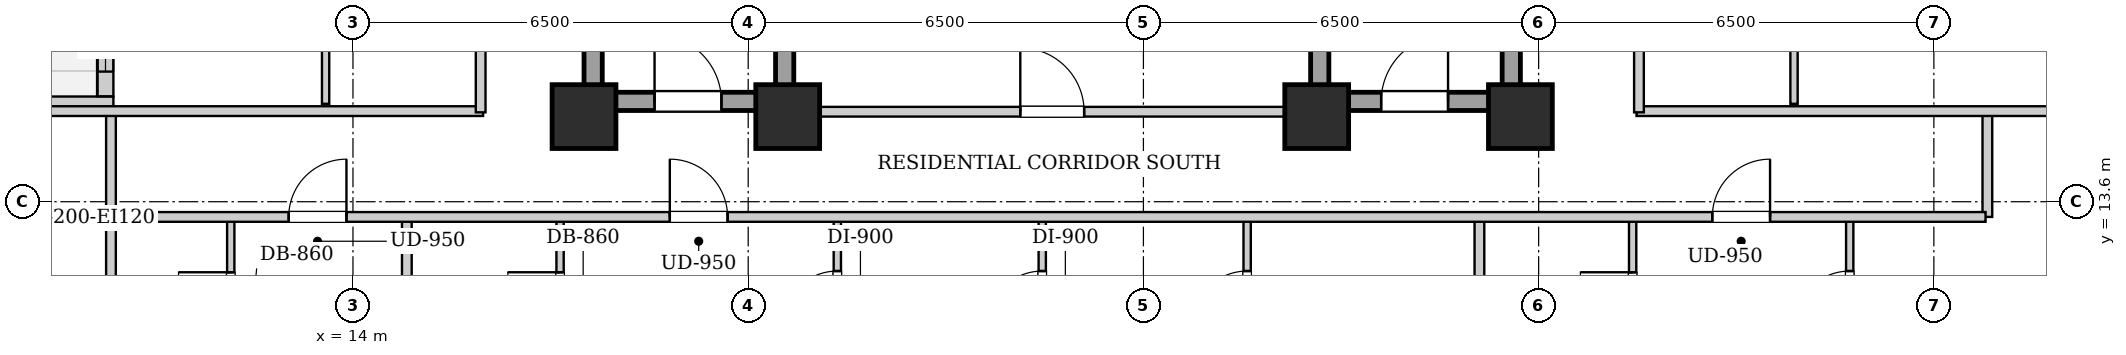
"""IFC4 building model, lengths in metres.
Left out: names, types, materials, properties, quantities, classifications, styles, units other than length and angle.
Written with IfcOpenShell. Run it as: python <this file> out.ifc"""

import sys

from ifc_helpers import new_model, si_unit, direction, frame, frame_2d, origin, origin_2d, place, context, subcontext, project, spatial, rectangle, extrude, element, fill, save


model = new_model("IFC4")
c1 = context("Model", 3, precision=1e-05, world=origin(), true_north=direction((0.0, 1.0)))
c2 = subcontext(c1, "Body", "Model", "MODEL_VIEW")
j1 = project(units=[si_unit("LENGTHUNIT", "METRE"), si_unit("PLANEANGLEUNIT", "RADIAN")], contexts=[c1])
p1 = place(None, origin())
s1 = spatial("IfcSite", under=j1, at=p1, CompositionType="ELEMENT")
p2 = place(p1, origin())
s2 = spatial("IfcBuilding", under=s1, at=p2, CompositionType="ELEMENT")
p3 = place(p2, frame((0.0, 0.0, 75.1)))
s3 = spatial("IfcBuildingStorey", under=s2, at=p3, CompositionType="ELEMENT", Elevation=75.1)
for number, where, z_axis, x_axis in (
    (1, (17.8, 15.0, 0.0), (0.0, 0.0, 1.0), (1.0, 0.0, 0.0)),
    (2, (21.15, 15.0, 0.0), (0.0, 0.0, 1.0), (1.0, 0.0, 0.0)),
    (3, (29.85, 15.0, 0.0), (0.0, 0.0, 1.0), (1.0, 0.0, 0.0)),
    (4, (33.2, 15.0, 0.0), (0.0, 0.0, 1.0), (1.0, 0.0, 0.0)),
):
    element("IfcColumn", number, at=place(p3, frame(where, z_axis=z_axis, x_axis=x_axis)), inside=s3, PredefinedType="COLUMN", context=c2, shape_type="SweptSolid", body=[
        extrude(rectangle(XDim=1.05, YDim=1.05, at=origin_2d()), origin(), (0.0, 0.0, 1.0), 3.2),
    ])
p4 = place(p3, frame((7.66, 15.2, 0.0), z_axis=(0.0, 0.0, 1.0), x_axis=(1.0, 0.0, 0.0)))
e5 = element("IfcWall", 5, at=p4, inside=s3, PredefinedType="SOLIDWALL", context=c2, shape_type="SweptSolid", body=[
    extrude(rectangle(XDim=2.4, YDim=0.26, at=frame_2d((1.2, 0.0))), origin(), (0.0, 0.0, 1.0), 2.94),
])
p5 = place(p3, frame((9.93, 15.334, 0.0), z_axis=(0.0, 0.0, 1.0), x_axis=(0.0, 1.0, 0.0)))
e6 = element("IfcWall", 6, at=p5, inside=s3, PredefinedType="SOLIDWALL", context=c2, shape_type="SweptSolid", body=[
    extrude(rectangle(XDim=3.932, YDim=0.26, at=frame_2d((1.966, 0.0))), origin(), (0.0, 0.0, 1.0), 2.94),
])
p6 = place(p5, frame((1.416, 0.0, 0.0)))
e7 = element("IfcOpeningElement", 7, at=p6, cuts=e6, PredefinedType="OPENING", context=c2, shape_type="SweptSolid", body=[
    extrude(rectangle(XDim=1.1, YDim=2.0, at=frame_2d((0.55, 1.0))), frame((0.0, 0.14, 0.0), z_axis=(0.0, -1.0, 0.0), x_axis=(1.0, 0.0, 0.0)), (0.0, 0.0, 1.0), 0.28),
])
p7 = place(p5, frame((0.406, 0.0, 0.55)))
e8 = element("IfcOpeningElement", 8, at=p7, cuts=e6, PredefinedType="OPENING", context=c2, shape_type="SweptSolid", body=[
    extrude(rectangle(XDim=0.85, YDim=1.2, at=frame_2d((0.425, 0.6))), frame((0.0, 0.14, 0.0), z_axis=(0.0, -1.0, 0.0), x_axis=(1.0, 0.0, 0.0)), (0.0, 0.0, 1.0), 0.28),
])
for number, where, z_axis, x_axis in (
    (9, (17.95, 15.1, 0.0), (0.0, 0.0, 1.0), (0.0, 1.0, 0.0)),
    (10, (21.1, 15.1, 0.0), (0.0, 0.0, 1.0), (0.0, 1.0, 0.0)),
):
    element("IfcWall", number, at=place(p3, frame(where, z_axis=z_axis, x_axis=x_axis)), inside=s3, PredefinedType="SHEAR", context=c2, shape_type="SweptSolid", body=[
        extrude(rectangle(XDim=9.0, YDim=0.3, at=frame_2d((4.5, 0.0))), origin(), (0.0, 0.0, 1.0), 2.94),
    ])
p8 = place(p3, frame((18.1, 15.25, 0.0), z_axis=(0.0, 0.0, 1.0), x_axis=(1.0, 0.0, 0.0)))
e11 = element("IfcWall", 11, at=p8, inside=s3, PredefinedType="SHEAR", context=c2, shape_type="SweptSolid", body=[
    extrude(rectangle(XDim=2.85, YDim=0.3, at=frame_2d((1.425, 0.0))), origin(), (0.0, 0.0, 1.0), 2.94),
])
p9 = place(p8, frame((0.86, 0.0, 0.0)))
e12 = element("IfcOpeningElement", 12, at=p9, cuts=e11, PredefinedType="OPENING", context=c2, shape_type="SweptSolid", body=[
    extrude(rectangle(XDim=1.1, YDim=2.05, at=frame_2d((0.55, 1.025))), frame((0.0, 0.16, 0.0), z_axis=(0.0, -1.0, 0.0), x_axis=(1.0, 0.0, 0.0)), (0.0, 0.0, 1.0), 0.32),
])
for number, where, z_axis, x_axis in (
    (13, (29.9, 15.1, 0.0), (0.0, 0.0, 1.0), (0.0, 1.0, 0.0)),
    (14, (33.05, 15.1, 0.0), (0.0, 0.0, 1.0), (0.0, 1.0, 0.0)),
):
    element("IfcWall", number, at=place(p3, frame(where, z_axis=z_axis, x_axis=x_axis)), inside=s3, PredefinedType="SHEAR", context=c2, shape_type="SweptSolid", body=[
        extrude(rectangle(XDim=9.0, YDim=0.3, at=frame_2d((4.5, 0.0))), origin(), (0.0, 0.0, 1.0), 2.94),
    ])
p10 = place(p3, frame((30.05, 15.25, 0.0), z_axis=(0.0, 0.0, 1.0), x_axis=(1.0, 0.0, 0.0)))
e15 = element("IfcWall", 15, at=p10, inside=s3, PredefinedType="SHEAR", context=c2, shape_type="SweptSolid", body=[
    extrude(rectangle(XDim=2.85, YDim=0.3, at=frame_2d((1.425, 0.0))), origin(), (0.0, 0.0, 1.0), 2.94),
])
p11 = place(p10, frame((0.86, 0.0, 0.0)))
e16 = element("IfcOpeningElement", 16, at=p11, cuts=e15, PredefinedType="OPENING", context=c2, shape_type="SweptSolid", body=[
    extrude(rectangle(XDim=1.1, YDim=2.05, at=frame_2d((0.55, 1.025))), frame((0.0, 0.16, 0.0), z_axis=(0.0, -1.0, 0.0), x_axis=(1.0, 0.0, 0.0)), (0.0, 0.0, 1.0), 0.32),
])
p12 = place(p3, frame((21.25, 15.08, 0.0), z_axis=(0.0, 0.0, 1.0), x_axis=(1.0, 0.0, 0.0)))
e17 = element("IfcWall", 17, at=p12, inside=s3, PredefinedType="PARTITIONING", context=c2, shape_type="SweptSolid", body=[
    extrude(rectangle(XDim=8.5, YDim=0.16, at=frame_2d((4.25, 0.0))), origin(), (0.0, 0.0, 1.0), 2.309),
])
p13 = place(p12, frame((3.725, 0.0, 0.0)))
e18 = element("IfcOpeningElement", 18, at=p13, cuts=e17, PredefinedType="OPENING", context=c2, shape_type="SweptSolid", body=[
    extrude(rectangle(XDim=1.05, YDim=2.05, at=frame_2d((0.525, 1.025))), frame((0.0, 0.09, 0.0), z_axis=(0.0, -1.0, 0.0), x_axis=(1.0, 0.0, 0.0)), (0.0, 0.0, 1.0), 0.18),
])
for number, where, z_axis, x_axis in (
    (19, (10.02, 13.35, 0.0), (0.0, 0.0, 1.0), (0.0, 1.0, 0.0)),
    (20, (40.88, 13.35, 0.0), (0.0, 0.0, 1.0), (0.0, 1.0, 0.0)),
):
    element("IfcWall", number, at=place(p3, frame(where, z_axis=z_axis, x_axis=x_axis)), inside=s3, PredefinedType="PARTITIONING", context=c2, shape_type="SweptSolid", body=[
        extrude(rectangle(XDim=1.74, YDim=0.16, at=frame_2d((0.87, 0.0))), origin(), (0.0, 0.0, 1.0), 2.94),
    ])
p14 = place(p3, frame((7.78, 15.09, 0.0), z_axis=(0.0, 0.0, 1.0), x_axis=(1.0, 0.0, 0.0)))
e21 = element("IfcWall", 21, at=p14, inside=s3, PredefinedType="PARTITIONING", context=c2, shape_type="SweptSolid", body=[
    extrude(rectangle(XDim=8.36, YDim=0.16, at=frame_2d((4.18, 0.0))), origin(), (0.0, 0.0, 1.0), 2.309),
])
p15 = place(p3, frame((35.11, 15.09, 0.0), z_axis=(0.0, 0.0, 1.0), x_axis=(1.0, 0.0, 0.0)))
e22 = element("IfcWall", 22, at=p15, inside=s3, PredefinedType="PARTITIONING", context=c2, shape_type="SweptSolid", body=[
    extrude(rectangle(XDim=8.01, YDim=0.16, at=frame_2d((4.005, 0.0))), origin(), (0.0, 0.0, 1.0), 2.309),
])
p16 = place(p3, frame((10.02, 10.65, 0.0), z_axis=(0.0, 0.0, 1.0), x_axis=(0.0, 1.0, 0.0)))
e23 = element("IfcWall", 23, at=p16, inside=s3, PredefinedType="PARTITIONING", context=c2, shape_type="SweptSolid", body=[
    extrude(rectangle(XDim=2.66, YDim=0.16, at=frame_2d((1.33, 0.0))), origin(), (0.0, 0.0, 1.0), 2.94),
])
p17 = place(p3, frame((11.99, 10.71, 0.0), z_axis=(0.0, 0.0, 1.0), x_axis=(0.0, 1.0, 0.0)))
e24 = element("IfcWall", 24, at=p17, inside=s3, PredefinedType="PARTITIONING", context=c2, shape_type="SweptSolid", body=[
    extrude(rectangle(XDim=2.6, YDim=0.12, at=frame_2d((1.3, 0.0))), origin(), (0.0, 0.0, 1.0), 2.94),
])
p18 = place(p17, frame((0.87, 0.0, 0.0)))
e25 = element("IfcOpeningElement", 25, at=p18, cuts=e24, PredefinedType="OPENING", context=c2, shape_type="SweptSolid", body=[
    extrude(rectangle(XDim=0.86, YDim=2.05, at=frame_2d((0.43, 1.025))), frame((0.0, 0.07, 0.0), z_axis=(0.0, -1.0, 0.0), x_axis=(1.0, 0.0, 0.0)), (0.0, 0.0, 1.0), 0.14),
])
p19 = place(p3, frame((14.886, 2.26, 0.0), z_axis=(0.0, 0.0, 1.0), x_axis=(0.0, 1.0, 0.0)))
e26 = element("IfcWall", 26, at=p19, inside=s3, PredefinedType="PARTITIONING", context=c2, shape_type="SweptSolid", body=[
    extrude(rectangle(XDim=11.05, YDim=0.16, at=frame_2d((5.525, 0.0))), origin(), (0.0, 0.0, 1.0), 2.94),
])
p20 = place(p3, frame((17.406, 10.71, 0.0), z_axis=(0.0, 0.0, 1.0), x_axis=(0.0, 1.0, 0.0)))
e27 = element("IfcWall", 27, at=p20, inside=s3, PredefinedType="PARTITIONING", context=c2, shape_type="SweptSolid", body=[
    extrude(rectangle(XDim=2.6, YDim=0.12, at=frame_2d((1.3, 0.0))), origin(), (0.0, 0.0, 1.0), 2.94),
])
p21 = place(p20, frame((0.87, 0.0, 0.0)))
e28 = element("IfcOpeningElement", 28, at=p21, cuts=e27, PredefinedType="OPENING", context=c2, shape_type="SweptSolid", body=[
    extrude(rectangle(XDim=0.86, YDim=2.05, at=frame_2d((0.43, 1.025))), frame((0.0, 0.07, 0.0), z_axis=(0.0, -1.0, 0.0), x_axis=(1.0, 0.0, 0.0)), (0.0, 0.0, 1.0), 0.14),
])
p22 = place(p3, frame((21.966, 10.71, 0.0), z_axis=(0.0, 0.0, 1.0), x_axis=(0.0, 1.0, 0.0)))
e29 = element("IfcWall", 29, at=p22, inside=s3, PredefinedType="PARTITIONING", context=c2, shape_type="SweptSolid", body=[
    extrude(rectangle(XDim=2.6, YDim=0.12, at=frame_2d((1.3, 0.0))), origin(), (0.0, 0.0, 1.0), 2.94),
])
p23 = place(p22, frame((0.85, 0.0, 0.0)))
e30 = element("IfcOpeningElement", 30, at=p23, cuts=e29, PredefinedType="OPENING", context=c2, shape_type="SweptSolid", body=[
    extrude(rectangle(XDim=0.9, YDim=2.05, at=frame_2d((0.45, 1.025))), frame((0.0, 0.07, 0.0), z_axis=(0.0, -1.0, 0.0), x_axis=(1.0, 0.0, 0.0)), (0.0, 0.0, 1.0), 0.14),
])
p24 = place(p3, frame((25.336, 10.71, 0.0), z_axis=(0.0, 0.0, 1.0), x_axis=(0.0, 1.0, 0.0)))
e31 = element("IfcWall", 31, at=p24, inside=s3, PredefinedType="PARTITIONING", context=c2, shape_type="SweptSolid", body=[
    extrude(rectangle(XDim=2.6, YDim=0.12, at=frame_2d((1.3, 0.0))), origin(), (0.0, 0.0, 1.0), 2.94),
])
p25 = place(p24, frame((0.85, 0.0, 0.0)))
e32 = element("IfcOpeningElement", 32, at=p25, cuts=e31, PredefinedType="OPENING", context=c2, shape_type="SweptSolid", body=[
    extrude(rectangle(XDim=0.9, YDim=2.05, at=frame_2d((0.45, 1.025))), frame((0.0, 0.07, 0.0), z_axis=(0.0, -1.0, 0.0), x_axis=(1.0, 0.0, 0.0)), (0.0, 0.0, 1.0), 0.14),
])
p26 = place(p3, frame((28.706, 10.71, 0.0), z_axis=(0.0, 0.0, 1.0), x_axis=(0.0, 1.0, 0.0)))
e33 = element("IfcWall", 33, at=p26, inside=s3, PredefinedType="PARTITIONING", context=c2, shape_type="SweptSolid", body=[
    extrude(rectangle(XDim=2.6, YDim=0.12, at=frame_2d((1.3, 0.0))), origin(), (0.0, 0.0, 1.0), 2.94),
])
p27 = place(p26, frame((0.85, 0.0, 0.0)))
e34 = element("IfcOpeningElement", 34, at=p27, cuts=e33, PredefinedType="OPENING", context=c2, shape_type="SweptSolid", body=[
    extrude(rectangle(XDim=0.9, YDim=2.05, at=frame_2d((0.45, 1.025))), frame((0.0, 0.07, 0.0), z_axis=(0.0, -1.0, 0.0), x_axis=(1.0, 0.0, 0.0)), (0.0, 0.0, 1.0), 0.14),
])
p28 = place(p3, frame((32.526, 0.28, 0.0), z_axis=(0.0, 0.0, 1.0), x_axis=(0.0, 1.0, 0.0)))
e35 = element("IfcWall", 35, at=p28, inside=s3, PredefinedType="PARTITIONING", context=c2, shape_type="SweptSolid", body=[
    extrude(rectangle(XDim=13.03, YDim=0.16, at=frame_2d((6.515, 0.0))), origin(), (0.0, 0.0, 1.0), 2.94),
])
p29 = place(p3, frame((35.046, 10.71, 0.0), z_axis=(0.0, 0.0, 1.0), x_axis=(0.0, 1.0, 0.0)))
e36 = element("IfcWall", 36, at=p29, inside=s3, PredefinedType="PARTITIONING", context=c2, shape_type="SweptSolid", body=[
    extrude(rectangle(XDim=2.6, YDim=0.12, at=frame_2d((1.3, 0.0))), origin(), (0.0, 0.0, 1.0), 2.94),
])
p30 = place(p29, frame((0.87, 0.0, 0.0)))
e37 = element("IfcOpeningElement", 37, at=p30, cuts=e36, PredefinedType="OPENING", context=c2, shape_type="SweptSolid", body=[
    extrude(rectangle(XDim=0.86, YDim=2.05, at=frame_2d((0.43, 1.025))), frame((0.0, 0.07, 0.0), z_axis=(0.0, -1.0, 0.0), x_axis=(1.0, 0.0, 0.0)), (0.0, 0.0, 1.0), 0.14),
])
p31 = place(p3, frame((38.616, 10.71, 0.0), z_axis=(0.0, 0.0, 1.0), x_axis=(0.0, 1.0, 0.0)))
e38 = element("IfcWall", 38, at=p31, inside=s3, PredefinedType="PARTITIONING", context=c2, shape_type="SweptSolid", body=[
    extrude(rectangle(XDim=2.6, YDim=0.12, at=frame_2d((1.3, 0.0))), origin(), (0.0, 0.0, 1.0), 2.94),
])
p32 = place(p31, frame((0.85, 0.0, 0.0)))
e39 = element("IfcOpeningElement", 39, at=p32, cuts=e38, PredefinedType="OPENING", context=c2, shape_type="SweptSolid", body=[
    extrude(rectangle(XDim=0.9, YDim=2.05, at=frame_2d((0.45, 1.025))), frame((0.0, 0.07, 0.0), z_axis=(0.0, -1.0, 0.0), x_axis=(1.0, 0.0, 0.0)), (0.0, 0.0, 1.0), 0.14),
])
p33 = place(p3, frame((13.55, 15.21, 0.0), z_axis=(0.0, 0.0, 1.0), x_axis=(0.0, 1.0, 0.0)))
e40 = element("IfcWall", 40, at=p33, inside=s3, PredefinedType="PARTITIONING", context=c2, shape_type="SweptSolid", body=[
    extrude(rectangle(XDim=2.3, YDim=0.12, at=frame_2d((1.15, 0.0))), origin(), (0.0, 0.0, 1.0), 2.94),
])
p34 = place(p3, frame((37.7, 15.21, 0.0), z_axis=(0.0, 0.0, 1.0), x_axis=(0.0, 1.0, 0.0)))
e41 = element("IfcWall", 41, at=p34, inside=s3, PredefinedType="PARTITIONING", context=c2, shape_type="SweptSolid", body=[
    extrude(rectangle(XDim=1.85, YDim=0.12, at=frame_2d((0.925, 0.0))), origin(), (0.0, 0.0, 1.0), 2.94),
])
p35 = place(p3, frame((10.05, 13.35, 0.0), z_axis=(0.0, 0.0, 1.0), x_axis=(1.0, 0.0, 0.0)))
e42 = element("IfcWall", 42, at=p35, inside=s3, PredefinedType="PARTITIONING", context=c2, shape_type="SweptSolid", body=[
    extrude(rectangle(XDim=30.8, YDim=0.16, at=frame_2d((15.4, 0.0))), origin(), (0.0, 0.0, 1.0), 2.94),
])
p36 = place(p35, frame((2.893, 0.0, 0.0)))
e43 = element("IfcOpeningElement", 43, at=p36, cuts=e42, PredefinedType="OPENING", context=c2, shape_type="SweptSolid", body=[
    extrude(rectangle(XDim=0.95, YDim=2.1, at=frame_2d((0.475, 1.05))), frame((0.0, 0.09, 0.0), z_axis=(0.0, -1.0, 0.0), x_axis=(1.0, 0.0, 0.0)), (0.0, 0.0, 1.0), 0.18),
])
p37 = place(p35, frame((9.161, 0.0, 0.0)))
e44 = element("IfcOpeningElement", 44, at=p37, cuts=e42, PredefinedType="OPENING", context=c2, shape_type="SweptSolid", body=[
    extrude(rectangle(XDim=0.95, YDim=2.1, at=frame_2d((0.475, 1.05))), frame((0.0, 0.09, 0.0), z_axis=(0.0, -1.0, 0.0), x_axis=(1.0, 0.0, 0.0)), (0.0, 0.0, 1.0), 0.18),
])
p38 = place(p35, frame((26.306, 0.0, 0.0)))
e45 = element("IfcOpeningElement", 45, at=p38, cuts=e42, PredefinedType="OPENING", context=c2, shape_type="SweptSolid", body=[
    extrude(rectangle(XDim=0.95, YDim=2.1, at=frame_2d((0.475, 1.05))), frame((0.0, 0.09, 0.0), z_axis=(0.0, -1.0, 0.0), x_axis=(1.0, 0.0, 0.0)), (0.0, 0.0, 1.0), 0.18),
])
p39 = place(p3, frame((16.1, 15.07, 0.0), z_axis=(0.0, 0.0, 1.0), x_axis=(0.0, 1.0, 0.0)))
e46 = element("IfcWall", 46, at=p39, inside=s3, PredefinedType="PARTITIONING", context=c2, shape_type="SweptSolid", body=[
    extrude(rectangle(XDim=13.93, YDim=0.16, at=frame_2d((6.965, 0.0))), origin(), (0.0, 0.0, 1.0), 2.94),
])
p40 = place(p39, frame((4.385, 0.0, 0.0)))
e47 = element("IfcOpeningElement", 47, at=p40, cuts=e46, PredefinedType="OPENING", context=c2, shape_type="SweptSolid", body=[
    extrude(rectangle(XDim=0.95, YDim=2.1, at=frame_2d((0.475, 1.05))), frame((0.0, 0.09, 0.0), z_axis=(0.0, -1.0, 0.0), x_axis=(1.0, 0.0, 0.0)), (0.0, 0.0, 1.0), 0.18),
])
p41 = place(p3, frame((35.15, 15.07, 0.0), z_axis=(0.0, 0.0, 1.0), x_axis=(0.0, 1.0, 0.0)))
e48 = element("IfcWall", 48, at=p41, inside=s3, PredefinedType="PARTITIONING", context=c2, shape_type="SweptSolid", body=[
    extrude(rectangle(XDim=13.93, YDim=0.16, at=frame_2d((6.965, 0.0))), origin(), (0.0, 0.0, 1.0), 2.94),
])
p42 = place(p41, frame((3.608, 0.0, 0.0)))
e49 = element("IfcOpeningElement", 49, at=p42, cuts=e48, PredefinedType="OPENING", context=c2, shape_type="SweptSolid", body=[
    extrude(rectangle(XDim=0.95, YDim=2.1, at=frame_2d((0.475, 1.05))), frame((0.0, 0.09, 0.0), z_axis=(0.0, -1.0, 0.0), x_axis=(1.0, 0.0, 0.0)), (0.0, 0.0, 1.0), 0.18),
])
p43 = place(p41, frame((10.649, 0.0, 0.0)))
e50 = element("IfcOpeningElement", 50, at=p43, cuts=e48, PredefinedType="OPENING", context=c2, shape_type="SweptSolid", body=[
    extrude(rectangle(XDim=0.95, YDim=2.1, at=frame_2d((0.475, 1.05))), frame((0.0, 0.09, 0.0), z_axis=(0.0, -1.0, 0.0), x_axis=(1.0, 0.0, 0.0)), (0.0, 0.0, 1.0), 0.18),
])
p44 = place(p9, origin())
e51 = element("IfcDoor", 51, at=p44, inside=s3, OperationType="SINGLE_SWING_LEFT", PredefinedType="DOOR", context=c2, shape_type="SweptSolid", body=[
    extrude(rectangle(XDim=1.1, YDim=2.05, at=frame_2d((0.55, 1.025))), frame((0.0, 0.025, 0.0), z_axis=(0.0, -1.0, 0.0), x_axis=(1.0, 0.0, 0.0)), (0.0, 0.0, 1.0), 0.05),
])
fill(e12, e51)
p45 = place(p11, origin())
e52 = element("IfcDoor", 52, at=p45, inside=s3, OperationType="SINGLE_SWING_RIGHT", PredefinedType="DOOR", context=c2, shape_type="SweptSolid", body=[
    extrude(rectangle(XDim=1.1, YDim=2.05, at=frame_2d((0.55, 1.025))), frame((0.0, 0.025, 0.0), z_axis=(0.0, -1.0, 0.0), x_axis=(1.0, 0.0, 0.0)), (0.0, 0.0, 1.0), 0.05),
])
fill(e16, e52)
p46 = place(p13, origin())
e53 = element("IfcDoor", 53, at=p46, inside=s3, OperationType="SINGLE_SWING_LEFT", PredefinedType="DOOR", context=c2, shape_type="SweptSolid", body=[
    extrude(rectangle(XDim=1.05, YDim=2.05, at=frame_2d((0.525, 1.025))), frame((0.0, 0.025, 0.0), z_axis=(0.0, -1.0, 0.0), x_axis=(1.0, 0.0, 0.0)), (0.0, 0.0, 1.0), 0.05),
])
fill(e18, e53)
p47 = place(p18, origin())
e54 = element("IfcDoor", 54, at=p47, inside=s3, OperationType="SINGLE_SWING_RIGHT", PredefinedType="DOOR", context=c2, shape_type="SweptSolid", body=[
    extrude(rectangle(XDim=0.86, YDim=2.05, at=frame_2d((0.43, 1.025))), frame((0.0, 0.025, 0.0), z_axis=(0.0, -1.0, 0.0), x_axis=(1.0, 0.0, 0.0)), (0.0, 0.0, 1.0), 0.05),
])
fill(e25, e54)
p48 = place(p21, origin())
e55 = element("IfcDoor", 55, at=p48, inside=s3, OperationType="SINGLE_SWING_RIGHT", PredefinedType="DOOR", context=c2, shape_type="SweptSolid", body=[
    extrude(rectangle(XDim=0.86, YDim=2.05, at=frame_2d((0.43, 1.025))), frame((0.0, 0.025, 0.0), z_axis=(0.0, -1.0, 0.0), x_axis=(1.0, 0.0, 0.0)), (0.0, 0.0, 1.0), 0.05),
])
fill(e28, e55)
p49 = place(p23, origin())
e56 = element("IfcDoor", 56, at=p49, inside=s3, OperationType="SINGLE_SWING_LEFT", PredefinedType="DOOR", context=c2, shape_type="SweptSolid", body=[
    extrude(rectangle(XDim=0.9, YDim=2.05, at=frame_2d((0.45, 1.025))), frame((0.0, 0.025, 0.0), z_axis=(0.0, -1.0, 0.0), x_axis=(1.0, 0.0, 0.0)), (0.0, 0.0, 1.0), 0.05),
])
fill(e30, e56)
p50 = place(p25, origin())
e57 = element("IfcDoor", 57, at=p50, inside=s3, OperationType="SINGLE_SWING_LEFT", PredefinedType="DOOR", context=c2, shape_type="SweptSolid", body=[
    extrude(rectangle(XDim=0.9, YDim=2.05, at=frame_2d((0.45, 1.025))), frame((0.0, 0.025, 0.0), z_axis=(0.0, -1.0, 0.0), x_axis=(1.0, 0.0, 0.0)), (0.0, 0.0, 1.0), 0.05),
])
fill(e32, e57)
p51 = place(p27, origin())
e58 = element("IfcDoor", 58, at=p51, inside=s3, OperationType="SINGLE_SWING_LEFT", PredefinedType="DOOR", context=c2, shape_type="SweptSolid", body=[
    extrude(rectangle(XDim=0.9, YDim=2.05, at=frame_2d((0.45, 1.025))), frame((0.0, 0.025, 0.0), z_axis=(0.0, -1.0, 0.0), x_axis=(1.0, 0.0, 0.0)), (0.0, 0.0, 1.0), 0.05),
])
fill(e34, e58)
p52 = place(p30, origin())
e59 = element("IfcDoor", 59, at=p52, inside=s3, OperationType="SINGLE_SWING_RIGHT", PredefinedType="DOOR", context=c2, shape_type="SweptSolid", body=[
    extrude(rectangle(XDim=0.86, YDim=2.05, at=frame_2d((0.43, 1.025))), frame((0.0, 0.025, 0.0), z_axis=(0.0, -1.0, 0.0), x_axis=(1.0, 0.0, 0.0)), (0.0, 0.0, 1.0), 0.05),
])
fill(e37, e59)
p53 = place(p32, origin())
e60 = element("IfcDoor", 60, at=p53, inside=s3, OperationType="SINGLE_SWING_LEFT", PredefinedType="DOOR", context=c2, shape_type="SweptSolid", body=[
    extrude(rectangle(XDim=0.9, YDim=2.05, at=frame_2d((0.45, 1.025))), frame((0.0, 0.025, 0.0), z_axis=(0.0, -1.0, 0.0), x_axis=(1.0, 0.0, 0.0)), (0.0, 0.0, 1.0), 0.05),
])
fill(e39, e60)
p54 = place(p36, origin())
e61 = element("IfcDoor", 61, at=p54, inside=s3, OperationType="SINGLE_SWING_RIGHT", PredefinedType="DOOR", context=c2, shape_type="SweptSolid", body=[
    extrude(rectangle(XDim=0.95, YDim=2.1, at=frame_2d((0.475, 1.05))), frame((0.0, 0.025, 0.0), z_axis=(0.0, -1.0, 0.0), x_axis=(1.0, 0.0, 0.0)), (0.0, 0.0, 1.0), 0.05),
])
fill(e43, e61)
p55 = place(p37, origin())
e62 = element("IfcDoor", 62, at=p55, inside=s3, OperationType="SINGLE_SWING_LEFT", PredefinedType="DOOR", context=c2, shape_type="SweptSolid", body=[
    extrude(rectangle(XDim=0.95, YDim=2.1, at=frame_2d((0.475, 1.05))), frame((0.0, 0.025, 0.0), z_axis=(0.0, -1.0, 0.0), x_axis=(1.0, 0.0, 0.0)), (0.0, 0.0, 1.0), 0.05),
])
fill(e44, e62)
p56 = place(p38, origin())
e63 = element("IfcDoor", 63, at=p56, inside=s3, OperationType="SINGLE_SWING_RIGHT", PredefinedType="DOOR", context=c2, shape_type="SweptSolid", body=[
    extrude(rectangle(XDim=0.95, YDim=2.1, at=frame_2d((0.475, 1.05))), frame((0.0, 0.025, 0.0), z_axis=(0.0, -1.0, 0.0), x_axis=(1.0, 0.0, 0.0)), (0.0, 0.0, 1.0), 0.05),
])
fill(e45, e63)
p57 = place(p7, origin())
e64 = element("IfcWindow", 64, at=p57, inside=s3, PartitioningType="SINGLE_PANEL", PredefinedType="WINDOW", context=c2, shape_type="SweptSolid", body=[
    extrude(rectangle(XDim=0.85, YDim=1.2, at=frame_2d((0.425, 0.6))), frame((0.0, 0.03, 0.0), z_axis=(0.0, -1.0, 0.0), x_axis=(1.0, 0.0, 0.0)), (0.0, 0.0, 1.0), 0.06),
])
fill(e8, e64)
save(model, sys.argv[1])
